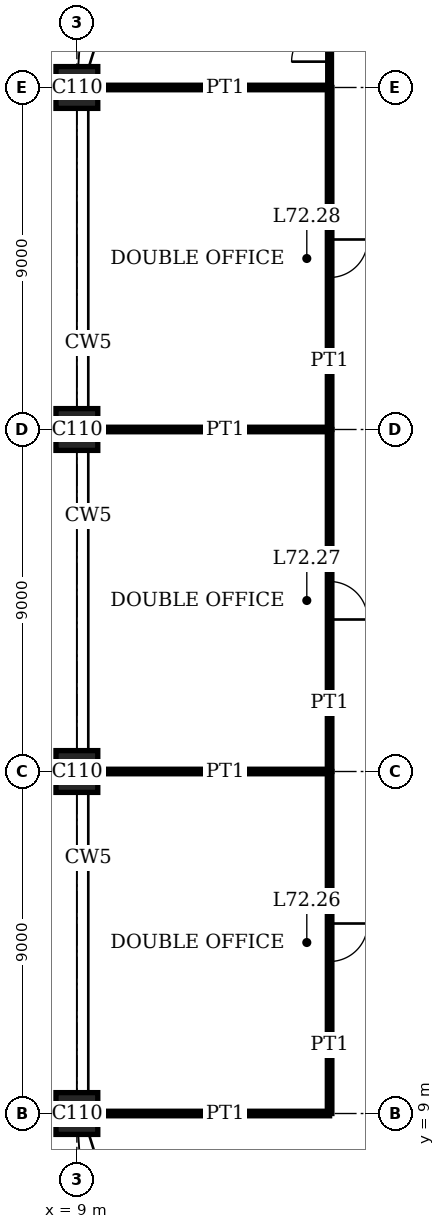
"""IFC4 building model, lengths in metres.
Left out: names, types, materials, properties, quantities, classifications, styles, units other than length and angle.
Written with IfcOpenShell. Run it as: python <this file> out.ifc"""

import sys

from ifc_helpers import new_model, si_unit, direction, frame, frame_2d, origin, origin_2d, place, context, subcontext, project, spatial, rectangle, extrude, element, fill, save


model = new_model("IFC4")
c1 = context("Model", 3, precision=1e-05, world=origin(), true_north=direction((0.0, 1.0)))
c2 = subcontext(c1, "Body", "Model", "MODEL_VIEW")
j1 = project(units=[si_unit("LENGTHUNIT", "METRE"), si_unit("PLANEANGLEUNIT", "RADIAN")], contexts=[c1])
p1 = place(None, origin())
s1 = spatial("IfcSite", under=j1, at=p1, CompositionType="ELEMENT")
p2 = place(p1, origin())
s2 = spatial("IfcBuilding", under=s1, at=p2, CompositionType="ELEMENT")
p3 = place(p2, frame((0.0, 0.0, 295.4)))
s3 = spatial("IfcBuildingStorey", under=s2, at=p3, CompositionType="ELEMENT", Elevation=295.4)
for number, where, z_axis, x_axis in (
    (1, (9.0, 9.0, 0.0), (0.0, 0.0, 1.0), (1.0, 0.0, 0.0)),
    (2, (9.0, 18.0, 0.0), (0.0, 0.0, 1.0), (1.0, 0.0, 0.0)),
    (3, (9.0, 27.0, 0.0), (0.0, 0.0, 1.0), (1.0, 0.0, 0.0)),
    (4, (9.0, 36.0, 0.0), (0.0, 0.0, 1.0), (1.0, 0.0, 0.0)),
):
    element("IfcColumn", number, at=place(p3, frame(where, z_axis=z_axis, x_axis=x_axis)), inside=s3, PredefinedType="COLUMN", context=c2, shape_type="SweptSolid", body=[
        extrude(rectangle(XDim=1.1, YDim=1.1, at=origin_2d()), origin(), (0.0, 0.0, 1.0), 4.0),
    ])
for number, where, z_axis, x_axis in (
    (5, (9.55, 9.0, 0.0), (0.0, 0.0, 1.0), (1.0, 0.0, 0.0)),
    (6, (9.55, 18.0, 0.0), (0.0, 0.0, 1.0), (1.0, 0.0, 0.0)),
    (7, (9.55, 27.0, 0.0), (0.0, 0.0, 1.0), (1.0, 0.0, 0.0)),
    (8, (9.55, 36.0, 0.0), (0.0, 0.0, 1.0), (1.0, 0.0, 0.0)),
):
    element("IfcWall", number, at=place(p3, frame(where, z_axis=z_axis, x_axis=x_axis)), inside=s3, PredefinedType="PARTITIONING", context=c2, shape_type="SweptSolid", body=[
        extrude(rectangle(XDim=6.1, YDim=0.12, at=frame_2d((3.05, 0.0))), origin(), (0.0, 0.0, 1.0), 3.05),
    ])
p4 = place(p3, frame((15.65, 9.0, 0.0), z_axis=(0.0, 0.0, 1.0), x_axis=(0.0, 1.0, 0.0)))
e9 = element("IfcWall", 9, at=p4, inside=s3, PredefinedType="PARTITIONING", context=c2, shape_type="SweptSolid", body=[
    extrude(rectangle(XDim=9.0, YDim=0.12, at=frame_2d((4.5, 0.0))), origin(), (0.0, 0.0, 1.0), 3.75),
])
p5 = place(p4, frame((4.0, 0.0, 0.0)))
e10 = element("IfcOpeningElement", 10, at=p5, cuts=e9, PredefinedType="OPENING", context=c2, shape_type="SweptSolid", body=[
    extrude(rectangle(XDim=1.0, YDim=2.4, at=frame_2d((0.5, 1.2))), frame((0.0, 0.07, 0.0), z_axis=(0.0, -1.0, 0.0), x_axis=(1.0, 0.0, 0.0)), (0.0, 0.0, 1.0), 0.14),
])
p6 = place(p3, frame((15.65, 18.0, 0.0), z_axis=(0.0, 0.0, 1.0), x_axis=(0.0, 1.0, 0.0)))
e11 = element("IfcWall", 11, at=p6, inside=s3, PredefinedType="PARTITIONING", context=c2, shape_type="SweptSolid", body=[
    extrude(rectangle(XDim=9.0, YDim=0.12, at=frame_2d((4.5, 0.0))), origin(), (0.0, 0.0, 1.0), 3.75),
])
p7 = place(p6, frame((4.0, 0.0, 0.0)))
e12 = element("IfcOpeningElement", 12, at=p7, cuts=e11, PredefinedType="OPENING", context=c2, shape_type="SweptSolid", body=[
    extrude(rectangle(XDim=1.0, YDim=2.4, at=frame_2d((0.5, 1.2))), frame((0.0, 0.07, 0.0), z_axis=(0.0, -1.0, 0.0), x_axis=(1.0, 0.0, 0.0)), (0.0, 0.0, 1.0), 0.14),
])
p8 = place(p3, frame((15.65, 27.0, 0.0), z_axis=(0.0, 0.0, 1.0), x_axis=(0.0, 1.0, 0.0)))
e13 = element("IfcWall", 13, at=p8, inside=s3, PredefinedType="PARTITIONING", context=c2, shape_type="SweptSolid", body=[
    extrude(rectangle(XDim=9.0, YDim=0.12, at=frame_2d((4.5, 0.0))), origin(), (0.0, 0.0, 1.0), 3.75),
])
p9 = place(p8, frame((4.0, 0.0, 0.0)))
e14 = element("IfcOpeningElement", 14, at=p9, cuts=e13, PredefinedType="OPENING", context=c2, shape_type="SweptSolid", body=[
    extrude(rectangle(XDim=1.0, YDim=2.4, at=frame_2d((0.5, 1.2))), frame((0.0, 0.07, 0.0), z_axis=(0.0, -1.0, 0.0), x_axis=(1.0, 0.0, 0.0)), (0.0, 0.0, 1.0), 0.14),
])
p10 = place(p3, frame((15.65, 36.01, 0.0), z_axis=(0.0, 0.0, 1.0), x_axis=(0.0, 1.0, 0.0)))
e15 = element("IfcWall", 15, at=p10, inside=s3, PredefinedType="PARTITIONING", context=c2, shape_type="SweptSolid", body=[
    extrude(rectangle(XDim=2.34, YDim=0.1, at=frame_2d((1.17, 0.0))), origin(), (0.0, 0.0, 1.0), 3.75),
])
p11 = place(p10, frame((0.67, 0.0, 0.0)))
e16 = element("IfcOpeningElement", 16, at=p11, cuts=e15, PredefinedType="OPENING", context=c2, shape_type="SweptSolid", body=[
    extrude(rectangle(XDim=1.0, YDim=2.4, at=frame_2d((0.5, 1.2))), frame((0.0, 0.06, 0.0), z_axis=(0.0, -1.0, 0.0), x_axis=(1.0, 0.0, 0.0)), (0.0, 0.0, 1.0), 0.12),
])
p12 = place(p5, origin())
e17 = element("IfcDoor", 17, at=p12, inside=s3, OperationType="SINGLE_SWING_RIGHT", PredefinedType="DOOR", context=c2, shape_type="SweptSolid", body=[
    extrude(rectangle(XDim=1.0, YDim=2.4, at=frame_2d((0.5, 1.2))), frame((0.0, 0.025, 0.0), z_axis=(0.0, -1.0, 0.0), x_axis=(1.0, 0.0, 0.0)), (0.0, 0.0, 1.0), 0.05),
])
fill(e10, e17)
p13 = place(p7, origin())
e18 = element("IfcDoor", 18, at=p13, inside=s3, OperationType="SINGLE_SWING_LEFT", PredefinedType="DOOR", context=c2, shape_type="SweptSolid", body=[
    extrude(rectangle(XDim=1.0, YDim=2.4, at=frame_2d((0.5, 1.2))), frame((0.0, 0.025, 0.0), z_axis=(0.0, -1.0, 0.0), x_axis=(1.0, 0.0, 0.0)), (0.0, 0.0, 1.0), 0.05),
])
fill(e12, e18)
p14 = place(p9, origin())
e19 = element("IfcDoor", 19, at=p14, inside=s3, OperationType="SINGLE_SWING_RIGHT", PredefinedType="DOOR", context=c2, shape_type="SweptSolid", body=[
    extrude(rectangle(XDim=1.0, YDim=2.4, at=frame_2d((0.5, 1.2))), frame((0.0, 0.025, 0.0), z_axis=(0.0, -1.0, 0.0), x_axis=(1.0, 0.0, 0.0)), (0.0, 0.0, 1.0), 0.05),
])
fill(e14, e19)
p15 = place(p11, origin())
e20 = element("IfcDoor", 20, at=p15, inside=s3, OperationType="SINGLE_SWING_RIGHT", PredefinedType="DOOR", context=c2, shape_type="SweptSolid", body=[
    extrude(rectangle(XDim=1.0, YDim=2.4, at=frame_2d((0.5, 1.2))), frame((0.0, 0.02, 0.0), z_axis=(0.0, -1.0, 0.0), x_axis=(1.0, 0.0, 0.0)), (0.0, 0.0, 1.0), 0.04),
])
fill(e16, e20)
save(model, sys.argv[1])
